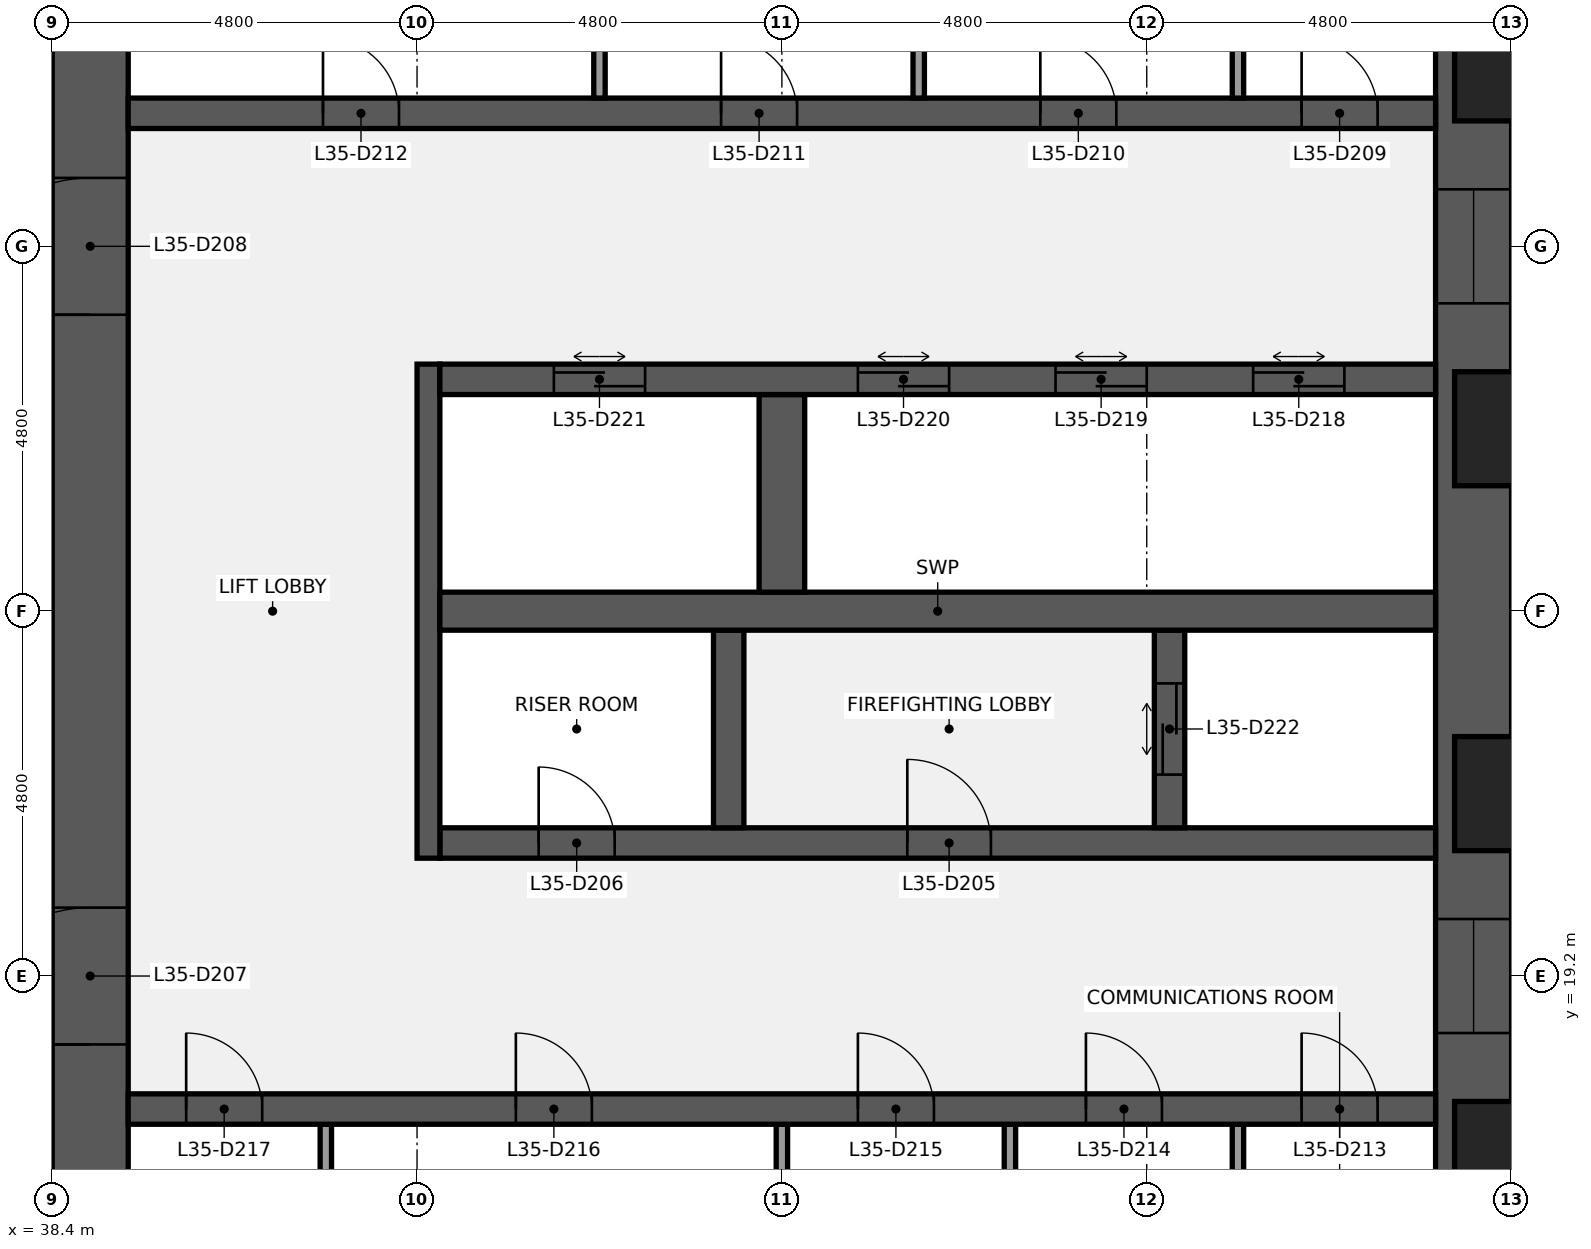
"""IFC4 building model, lengths in metres.
Left out: names, types, materials, properties, quantities, classifications, styles, units other than length and angle.
Written with IfcOpenShell. Run it as: python <this file> out.ifc"""

import sys

from ifc_helpers import new_model, si_unit, direction, frame, frame_2d, origin, place, context, subcontext, project, spatial, rectangle, extrude, element, fill, save


model = new_model("IFC4")
c1 = context("Model", 3, precision=1e-05, world=origin(), true_north=direction((0.0, 1.0)))
c2 = subcontext(c1, "Body", "Model", "MODEL_VIEW")
j1 = project(units=[si_unit("LENGTHUNIT", "METRE"), si_unit("PLANEANGLEUNIT", "RADIAN")], contexts=[c1])
p1 = place(None, origin())
s1 = spatial("IfcSite", under=j1, at=p1, CompositionType="ELEMENT")
p2 = place(p1, origin())
s2 = spatial("IfcBuilding", under=s1, at=p2, CompositionType="ELEMENT")
p3 = place(p2, frame((0.0, 0.0, 160.1)))
s3 = spatial("IfcBuildingStorey", under=s2, at=p3, CompositionType="ELEMENT", Elevation=160.1)
p4 = place(p3, frame((57.1, 38.4, 0.0), z_axis=(0.0, 0.0, 1.0), x_axis=(0.0, -1.0, 0.0)))
e1 = element("IfcWall", 1, at=p4, inside=s3, PredefinedType="SHEAR", context=c2, shape_type="SweptSolid", body=[
    extrude(rectangle(XDim=28.8, YDim=1.0, at=frame_2d((14.4, 0.0))), origin(), (0.0, 0.0, 1.0), 3.84),
])
p5 = place(p4, frame((18.45, 0.0, 0.9)))
e2 = element("IfcOpeningElement", 2, at=p5, cuts=e1, PredefinedType="OPENING", context=c2, shape_type="SweptSolid", body=[
    extrude(rectangle(XDim=1.5, YDim=1.5, at=frame_2d((0.75, 0.75))), frame((0.0, 0.51, 0.0), z_axis=(0.0, -1.0, 0.0), x_axis=(1.0, 0.0, 0.0)), (0.0, 0.0, 1.0), 1.02),
])
p6 = place(p4, frame((8.85, 0.0, 0.9)))
e3 = element("IfcOpeningElement", 3, at=p6, cuts=e1, PredefinedType="OPENING", context=c2, shape_type="SweptSolid", body=[
    extrude(rectangle(XDim=1.5, YDim=1.5, at=frame_2d((0.75, 0.75))), frame((0.0, 0.51, 0.0), z_axis=(0.0, -1.0, 0.0), x_axis=(1.0, 0.0, 0.0)), (0.0, 0.0, 1.0), 1.02),
])
p7 = place(p3, frame((38.9, 9.6, 0.0), z_axis=(0.0, 0.0, 1.0), x_axis=(0.0, 1.0, 0.0)))
e4 = element("IfcWall", 4, at=p7, inside=s3, PredefinedType="SHEAR", context=c2, shape_type="SweptSolid", body=[
    extrude(rectangle(XDim=28.8, YDim=1.0, at=frame_2d((14.4, 0.0))), origin(), (0.0, 0.0, 1.0), 3.84),
])
p8 = place(p7, frame((8.7, 0.0, 0.0)))
e5 = element("IfcOpeningElement", 5, at=p8, cuts=e4, PredefinedType="OPENING", context=c2, shape_type="SweptSolid", body=[
    extrude(rectangle(XDim=1.8, YDim=2.1, at=frame_2d((0.9, 1.05))), frame((0.0, 0.51, 0.0), z_axis=(0.0, -1.0, 0.0), x_axis=(1.0, 0.0, 0.0)), (0.0, 0.0, 1.0), 1.02),
])
p9 = place(p7, frame((18.3, 0.0, 0.0)))
e6 = element("IfcOpeningElement", 6, at=p9, cuts=e4, PredefinedType="OPENING", context=c2, shape_type="SweptSolid", body=[
    extrude(rectangle(XDim=1.8, YDim=2.1, at=frame_2d((0.9, 1.05))), frame((0.0, 0.51, 0.0), z_axis=(0.0, -1.0, 0.0), x_axis=(1.0, 0.0, 0.0)), (0.0, 0.0, 1.0), 1.02),
])
for number, where, z_axis, x_axis in (
    (7, (54.0, 14.65, 0.0), (0.0, 0.0, 1.0), (0.0, 1.0, 0.0)),
    (8, (51.0, 14.65, 0.0), (0.0, 0.0, 1.0), (0.0, 1.0, 0.0)),
    (9, (48.0, 14.65, 0.0), (0.0, 0.0, 1.0), (0.0, 1.0, 0.0)),
    (10, (42.0, 14.65, 0.0), (0.0, 0.0, 1.0), (0.0, 1.0, 0.0)),
):
    element("IfcWall", number, at=place(p3, frame(where, z_axis=z_axis, x_axis=x_axis)), inside=s3, PredefinedType="PARTITIONING", context=c2, shape_type="SweptSolid", body=[
        extrude(rectangle(XDim=2.6, YDim=0.15, at=frame_2d((1.3, 0.0))), origin(), (0.0, 0.0, 1.0), 3.84),
    ])
p10 = place(p3, frame((39.4, 17.45, 0.0), z_axis=(0.0, 0.0, 1.0), x_axis=(1.0, 0.0, 0.0)))
e11 = element("IfcWall", 11, at=p10, inside=s3, PredefinedType="SHEAR", context=c2, shape_type="SweptSolid", body=[
    extrude(rectangle(XDim=17.2, YDim=0.4, at=frame_2d((8.6, 0.0))), origin(), (0.0, 0.0, 1.0), 3.84),
])
p11 = place(p10, frame((15.438, 0.0, 0.0)))
e12 = element("IfcOpeningElement", 12, at=p11, cuts=e11, PredefinedType="OPENING", context=c2, shape_type="SweptSolid", body=[
    extrude(rectangle(XDim=1.0, YDim=2.1, at=frame_2d((0.5, 1.05))), frame((0.0, 0.21, 0.0), z_axis=(0.0, -1.0, 0.0), x_axis=(1.0, 0.0, 0.0)), (0.0, 0.0, 1.0), 0.42),
])
p12 = place(p10, frame((12.6, 0.0, 0.0)))
e13 = element("IfcOpeningElement", 13, at=p12, cuts=e11, PredefinedType="OPENING", context=c2, shape_type="SweptSolid", body=[
    extrude(rectangle(XDim=1.0, YDim=2.1, at=frame_2d((0.5, 1.05))), frame((0.0, 0.21, 0.0), z_axis=(0.0, -1.0, 0.0), x_axis=(1.0, 0.0, 0.0)), (0.0, 0.0, 1.0), 0.42),
])
p13 = place(p10, frame((9.6, 0.0, 0.0)))
e14 = element("IfcOpeningElement", 14, at=p13, cuts=e11, PredefinedType="OPENING", context=c2, shape_type="SweptSolid", body=[
    extrude(rectangle(XDim=1.0, YDim=2.1, at=frame_2d((0.5, 1.05))), frame((0.0, 0.21, 0.0), z_axis=(0.0, -1.0, 0.0), x_axis=(1.0, 0.0, 0.0)), (0.0, 0.0, 1.0), 0.42),
])
p14 = place(p10, frame((5.1, 0.0, 0.0)))
e15 = element("IfcOpeningElement", 15, at=p14, cuts=e11, PredefinedType="OPENING", context=c2, shape_type="SweptSolid", body=[
    extrude(rectangle(XDim=1.0, YDim=2.1, at=frame_2d((0.5, 1.05))), frame((0.0, 0.21, 0.0), z_axis=(0.0, -1.0, 0.0), x_axis=(1.0, 0.0, 0.0)), (0.0, 0.0, 1.0), 0.42),
])
p15 = place(p10, frame((0.762, 0.0, 0.0)))
e16 = element("IfcOpeningElement", 16, at=p15, cuts=e11, PredefinedType="OPENING", context=c2, shape_type="SweptSolid", body=[
    extrude(rectangle(XDim=1.0, YDim=2.1, at=frame_2d((0.5, 1.05))), frame((0.0, 0.21, 0.0), z_axis=(0.0, -1.0, 0.0), x_axis=(1.0, 0.0, 0.0)), (0.0, 0.0, 1.0), 0.42),
])
p16 = place(p3, frame((43.5, 20.95, 0.0), z_axis=(0.0, 0.0, 1.0), x_axis=(1.0, 0.0, 0.0)))
e17 = element("IfcWall", 17, at=p16, inside=s3, PredefinedType="SHEAR", context=c2, shape_type="SweptSolid", body=[
    extrude(rectangle(XDim=13.1, YDim=0.4, at=frame_2d((6.55, 0.0))), origin(), (0.0, 0.0, 1.0), 3.84),
])
p17 = place(p16, frame((6.15, 0.0, 0.0)))
e18 = element("IfcOpeningElement", 18, at=p17, cuts=e17, PredefinedType="OPENING", context=c2, shape_type="SweptSolid", body=[
    extrude(rectangle(XDim=1.1, YDim=2.1, at=frame_2d((0.55, 1.05))), frame((0.0, 0.21, 0.0), z_axis=(0.0, -1.0, 0.0), x_axis=(1.0, 0.0, 0.0)), (0.0, 0.0, 1.0), 0.42),
])
p18 = place(p16, frame((1.3, 0.0, 0.0)))
e19 = element("IfcOpeningElement", 19, at=p18, cuts=e17, PredefinedType="OPENING", context=c2, shape_type="SweptSolid", body=[
    extrude(rectangle(XDim=1.0, YDim=2.1, at=frame_2d((0.5, 1.05))), frame((0.0, 0.21, 0.0), z_axis=(0.0, -1.0, 0.0), x_axis=(1.0, 0.0, 0.0)), (0.0, 0.0, 1.0), 0.42),
])
p19 = place(p3, frame((43.35, 20.75, 0.0), z_axis=(0.0, 0.0, 1.0), x_axis=(0.0, 1.0, 0.0)))
e20 = element("IfcWall", 20, at=p19, inside=s3, PredefinedType="SHEAR", context=c2, shape_type="SweptSolid", body=[
    extrude(rectangle(XDim=6.5, YDim=0.3, at=frame_2d((3.25, 0.0))), origin(), (0.0, 0.0, 1.0), 3.84),
])
p20 = place(p3, frame((53.1, 21.15, 0.0), z_axis=(0.0, 0.0, 1.0), x_axis=(0.0, 1.0, 0.0)))
e21 = element("IfcWall", 21, at=p20, inside=s3, PredefinedType="SHEAR", context=c2, shape_type="SweptSolid", body=[
    extrude(rectangle(XDim=2.6, YDim=0.4, at=frame_2d((1.3, 0.0))), origin(), (0.0, 0.0, 1.0), 3.84),
])
p21 = place(p20, frame((0.7, 0.0, 0.0)))
e22 = element("IfcOpeningElement", 22, at=p21, cuts=e21, PredefinedType="OPENING", context=c2, shape_type="SweptSolid", body=[
    extrude(rectangle(XDim=1.2, YDim=2.1, at=frame_2d((0.6, 1.05))), frame((0.0, 0.21, 0.0), z_axis=(0.0, -1.0, 0.0), x_axis=(1.0, 0.0, 0.0)), (0.0, 0.0, 1.0), 0.42),
])
p22 = place(p3, frame((47.3, 21.15, 0.0), z_axis=(0.0, 0.0, 1.0), x_axis=(0.0, 1.0, 0.0)))
e23 = element("IfcWall", 23, at=p22, inside=s3, PredefinedType="SHEAR", context=c2, shape_type="SweptSolid", body=[
    extrude(rectangle(XDim=2.6, YDim=0.4, at=frame_2d((1.3, 0.0))), origin(), (0.0, 0.0, 1.0), 3.84),
])
p23 = place(p3, frame((43.5, 24.0, 0.0), z_axis=(0.0, 0.0, 1.0), x_axis=(1.0, 0.0, 0.0)))
e24 = element("IfcWall", 24, at=p23, inside=s3, PredefinedType="SHEAR", context=c2, shape_type="SweptSolid", body=[
    extrude(rectangle(XDim=13.1, YDim=0.5, at=frame_2d((6.55, 0.0))), origin(), (0.0, 0.0, 1.0), 3.84),
])
p24 = place(p3, frame((48.0, 24.25, 0.0), z_axis=(0.0, 0.0, 1.0), x_axis=(0.0, 1.0, 0.0)))
e25 = element("IfcWall", 25, at=p24, inside=s3, PredefinedType="SHEAR", context=c2, shape_type="SweptSolid", body=[
    extrude(rectangle(XDim=2.6, YDim=0.6, at=frame_2d((1.3, 0.0))), origin(), (0.0, 0.0, 1.0), 3.84),
])
p25 = place(p3, frame((43.5, 27.05, 0.0), z_axis=(0.0, 0.0, 1.0), x_axis=(1.0, 0.0, 0.0)))
e26 = element("IfcWall", 26, at=p25, inside=s3, PredefinedType="SHEAR", context=c2, shape_type="SweptSolid", body=[
    extrude(rectangle(XDim=13.1, YDim=0.4, at=frame_2d((6.55, 0.0))), origin(), (0.0, 0.0, 1.0), 3.84),
])
p26 = place(p25, frame((10.7, 0.0, 0.0)))
e27 = element("IfcOpeningElement", 27, at=p26, cuts=e26, PredefinedType="OPENING", context=c2, shape_type="SweptSolid", body=[
    extrude(rectangle(XDim=1.2, YDim=2.1, at=frame_2d((0.6, 1.05))), frame((0.0, 0.21, 0.0), z_axis=(0.0, -1.0, 0.0), x_axis=(1.0, 0.0, 0.0)), (0.0, 0.0, 1.0), 0.42),
])
p27 = place(p25, frame((8.1, 0.0, 0.0)))
e28 = element("IfcOpeningElement", 28, at=p27, cuts=e26, PredefinedType="OPENING", context=c2, shape_type="SweptSolid", body=[
    extrude(rectangle(XDim=1.2, YDim=2.1, at=frame_2d((0.6, 1.05))), frame((0.0, 0.21, 0.0), z_axis=(0.0, -1.0, 0.0), x_axis=(1.0, 0.0, 0.0)), (0.0, 0.0, 1.0), 0.42),
])
p28 = place(p25, frame((5.5, 0.0, 0.0)))
e29 = element("IfcOpeningElement", 29, at=p28, cuts=e26, PredefinedType="OPENING", context=c2, shape_type="SweptSolid", body=[
    extrude(rectangle(XDim=1.2, YDim=2.1, at=frame_2d((0.6, 1.05))), frame((0.0, 0.21, 0.0), z_axis=(0.0, -1.0, 0.0), x_axis=(1.0, 0.0, 0.0)), (0.0, 0.0, 1.0), 0.42),
])
p29 = place(p25, frame((1.5, 0.0, 0.0)))
e30 = element("IfcOpeningElement", 30, at=p29, cuts=e26, PredefinedType="OPENING", context=c2, shape_type="SweptSolid", body=[
    extrude(rectangle(XDim=1.2, YDim=2.1, at=frame_2d((0.6, 1.05))), frame((0.0, 0.21, 0.0), z_axis=(0.0, -1.0, 0.0), x_axis=(1.0, 0.0, 0.0)), (0.0, 0.0, 1.0), 0.42),
])
p30 = place(p3, frame((39.4, 30.55, 0.0), z_axis=(0.0, 0.0, 1.0), x_axis=(1.0, 0.0, 0.0)))
e31 = element("IfcWall", 31, at=p30, inside=s3, PredefinedType="SHEAR", context=c2, shape_type="SweptSolid", body=[
    extrude(rectangle(XDim=17.2, YDim=0.4, at=frame_2d((8.6, 0.0))), origin(), (0.0, 0.0, 1.0), 3.84),
])
p31 = place(p30, frame((15.438, 0.0, 0.0)))
e32 = element("IfcOpeningElement", 32, at=p31, cuts=e31, PredefinedType="OPENING", context=c2, shape_type="SweptSolid", body=[
    extrude(rectangle(XDim=1.0, YDim=2.1, at=frame_2d((0.5, 1.05))), frame((0.0, 0.21, 0.0), z_axis=(0.0, -1.0, 0.0), x_axis=(1.0, 0.0, 0.0)), (0.0, 0.0, 1.0), 0.42),
])
p32 = place(p30, frame((12.0, 0.0, 0.0)))
e33 = element("IfcOpeningElement", 33, at=p32, cuts=e31, PredefinedType="OPENING", context=c2, shape_type="SweptSolid", body=[
    extrude(rectangle(XDim=1.0, YDim=2.1, at=frame_2d((0.5, 1.05))), frame((0.0, 0.21, 0.0), z_axis=(0.0, -1.0, 0.0), x_axis=(1.0, 0.0, 0.0)), (0.0, 0.0, 1.0), 0.42),
])
p33 = place(p30, frame((7.8, 0.0, 0.0)))
e34 = element("IfcOpeningElement", 34, at=p33, cuts=e31, PredefinedType="OPENING", context=c2, shape_type="SweptSolid", body=[
    extrude(rectangle(XDim=1.0, YDim=2.1, at=frame_2d((0.5, 1.05))), frame((0.0, 0.21, 0.0), z_axis=(0.0, -1.0, 0.0), x_axis=(1.0, 0.0, 0.0)), (0.0, 0.0, 1.0), 0.42),
])
p34 = place(p30, frame((2.562, 0.0, 0.0)))
e35 = element("IfcOpeningElement", 35, at=p34, cuts=e31, PredefinedType="OPENING", context=c2, shape_type="SweptSolid", body=[
    extrude(rectangle(XDim=1.0, YDim=2.1, at=frame_2d((0.5, 1.05))), frame((0.0, 0.21, 0.0), z_axis=(0.0, -1.0, 0.0), x_axis=(1.0, 0.0, 0.0)), (0.0, 0.0, 1.0), 0.42),
])
for number, where, z_axis, x_axis in (
    (36, (54.0, 30.75, 0.0), (0.0, 0.0, 1.0), (0.0, 1.0, 0.0)),
    (37, (49.8, 30.75, 0.0), (0.0, 0.0, 1.0), (0.0, 1.0, 0.0)),
    (38, (45.6, 30.75, 0.0), (0.0, 0.0, 1.0), (0.0, 1.0, 0.0)),
):
    element("IfcWall", number, at=place(p3, frame(where, z_axis=z_axis, x_axis=x_axis)), inside=s3, PredefinedType="PARTITIONING", context=c2, shape_type="SweptSolid", body=[
        extrude(rectangle(XDim=2.6, YDim=0.15, at=frame_2d((1.3, 0.0))), origin(), (0.0, 0.0, 1.0), 3.84),
    ])
p35 = place(p17, origin())
e39 = element("IfcDoor", 39, at=p35, inside=s3, OperationType="SINGLE_SWING_LEFT", PredefinedType="DOOR", context=c2, shape_type="SweptSolid", body=[
    extrude(rectangle(XDim=1.1, YDim=2.1, at=frame_2d((0.55, 1.05))), frame((0.0, 0.025, 0.0), z_axis=(0.0, -1.0, 0.0), x_axis=(1.0, 0.0, 0.0)), (0.0, 0.0, 1.0), 0.05),
])
fill(e18, e39)
p36 = place(p18, origin())
e40 = element("IfcDoor", 40, at=p36, inside=s3, OperationType="SINGLE_SWING_LEFT", PredefinedType="DOOR", context=c2, shape_type="SweptSolid", body=[
    extrude(rectangle(XDim=1.0, YDim=2.1, at=frame_2d((0.5, 1.05))), frame((0.0, 0.025, 0.0), z_axis=(0.0, -1.0, 0.0), x_axis=(1.0, 0.0, 0.0)), (0.0, 0.0, 1.0), 0.05),
])
fill(e19, e40)
p37 = place(p8, origin())
e41 = element("IfcDoor", 41, at=p37, inside=s3, OperationType="DOUBLE_DOOR_SINGLE_SWING", PredefinedType="DOOR", context=c2, shape_type="SweptSolid", body=[
    extrude(rectangle(XDim=1.8, YDim=2.1, at=frame_2d((0.9, 1.05))), frame((0.0, 0.025, 0.0), z_axis=(0.0, -1.0, 0.0), x_axis=(1.0, 0.0, 0.0)), (0.0, 0.0, 1.0), 0.05),
])
fill(e5, e41)
p38 = place(p9, origin())
e42 = element("IfcDoor", 42, at=p38, inside=s3, OperationType="DOUBLE_DOOR_SINGLE_SWING", PredefinedType="DOOR", context=c2, shape_type="SweptSolid", body=[
    extrude(rectangle(XDim=1.8, YDim=2.1, at=frame_2d((0.9, 1.05))), frame((0.0, 0.025, 0.0), z_axis=(0.0, -1.0, 0.0), x_axis=(1.0, 0.0, 0.0)), (0.0, 0.0, 1.0), 0.05),
])
fill(e6, e42)
p39 = place(p31, origin())
e43 = element("IfcDoor", 43, at=p39, inside=s3, OperationType="SINGLE_SWING_LEFT", PredefinedType="DOOR", context=c2, shape_type="SweptSolid", body=[
    extrude(rectangle(XDim=1.0, YDim=2.1, at=frame_2d((0.5, 1.05))), frame((0.0, 0.025, 0.0), z_axis=(0.0, -1.0, 0.0), x_axis=(1.0, 0.0, 0.0)), (0.0, 0.0, 1.0), 0.05),
])
fill(e32, e43)
p40 = place(p32, origin())
e44 = element("IfcDoor", 44, at=p40, inside=s3, OperationType="SINGLE_SWING_LEFT", PredefinedType="DOOR", context=c2, shape_type="SweptSolid", body=[
    extrude(rectangle(XDim=1.0, YDim=2.1, at=frame_2d((0.5, 1.05))), frame((0.0, 0.025, 0.0), z_axis=(0.0, -1.0, 0.0), x_axis=(1.0, 0.0, 0.0)), (0.0, 0.0, 1.0), 0.05),
])
fill(e33, e44)
p41 = place(p33, origin())
e45 = element("IfcDoor", 45, at=p41, inside=s3, OperationType="SINGLE_SWING_LEFT", PredefinedType="DOOR", context=c2, shape_type="SweptSolid", body=[
    extrude(rectangle(XDim=1.0, YDim=2.1, at=frame_2d((0.5, 1.05))), frame((0.0, 0.025, 0.0), z_axis=(0.0, -1.0, 0.0), x_axis=(1.0, 0.0, 0.0)), (0.0, 0.0, 1.0), 0.05),
])
fill(e34, e45)
p42 = place(p34, origin())
e46 = element("IfcDoor", 46, at=p42, inside=s3, OperationType="SINGLE_SWING_LEFT", PredefinedType="DOOR", context=c2, shape_type="SweptSolid", body=[
    extrude(rectangle(XDim=1.0, YDim=2.1, at=frame_2d((0.5, 1.05))), frame((0.0, 0.025, 0.0), z_axis=(0.0, -1.0, 0.0), x_axis=(1.0, 0.0, 0.0)), (0.0, 0.0, 1.0), 0.05),
])
fill(e35, e46)
p43 = place(p11, origin())
e47 = element("IfcDoor", 47, at=p43, inside=s3, OperationType="SINGLE_SWING_LEFT", PredefinedType="DOOR", context=c2, shape_type="SweptSolid", body=[
    extrude(rectangle(XDim=1.0, YDim=2.1, at=frame_2d((0.5, 1.05))), frame((0.0, 0.025, 0.0), z_axis=(0.0, -1.0, 0.0), x_axis=(1.0, 0.0, 0.0)), (0.0, 0.0, 1.0), 0.05),
])
fill(e12, e47)
p44 = place(p12, origin())
e48 = element("IfcDoor", 48, at=p44, inside=s3, OperationType="SINGLE_SWING_LEFT", PredefinedType="DOOR", context=c2, shape_type="SweptSolid", body=[
    extrude(rectangle(XDim=1.0, YDim=2.1, at=frame_2d((0.5, 1.05))), frame((0.0, 0.025, 0.0), z_axis=(0.0, -1.0, 0.0), x_axis=(1.0, 0.0, 0.0)), (0.0, 0.0, 1.0), 0.05),
])
fill(e13, e48)
p45 = place(p13, origin())
e49 = element("IfcDoor", 49, at=p45, inside=s3, OperationType="SINGLE_SWING_LEFT", PredefinedType="DOOR", context=c2, shape_type="SweptSolid", body=[
    extrude(rectangle(XDim=1.0, YDim=2.1, at=frame_2d((0.5, 1.05))), frame((0.0, 0.025, 0.0), z_axis=(0.0, -1.0, 0.0), x_axis=(1.0, 0.0, 0.0)), (0.0, 0.0, 1.0), 0.05),
])
fill(e14, e49)
p46 = place(p14, origin())
e50 = element("IfcDoor", 50, at=p46, inside=s3, OperationType="SINGLE_SWING_LEFT", PredefinedType="DOOR", context=c2, shape_type="SweptSolid", body=[
    extrude(rectangle(XDim=1.0, YDim=2.1, at=frame_2d((0.5, 1.05))), frame((0.0, 0.025, 0.0), z_axis=(0.0, -1.0, 0.0), x_axis=(1.0, 0.0, 0.0)), (0.0, 0.0, 1.0), 0.05),
])
fill(e15, e50)
p47 = place(p15, origin())
e51 = element("IfcDoor", 51, at=p47, inside=s3, OperationType="SINGLE_SWING_LEFT", PredefinedType="DOOR", context=c2, shape_type="SweptSolid", body=[
    extrude(rectangle(XDim=1.0, YDim=2.1, at=frame_2d((0.5, 1.05))), frame((0.0, 0.025, 0.0), z_axis=(0.0, -1.0, 0.0), x_axis=(1.0, 0.0, 0.0)), (0.0, 0.0, 1.0), 0.05),
])
fill(e16, e51)
p48 = place(p26, origin())
e52 = element("IfcDoor", 52, at=p48, inside=s3, OperationType="DOUBLE_DOOR_SLIDING", PredefinedType="DOOR", context=c2, shape_type="SweptSolid", body=[
    extrude(rectangle(XDim=1.2, YDim=2.1, at=frame_2d((0.6, 1.05))), frame((0.0, 0.025, 0.0), z_axis=(0.0, -1.0, 0.0), x_axis=(1.0, 0.0, 0.0)), (0.0, 0.0, 1.0), 0.05),
])
fill(e27, e52)
p49 = place(p27, origin())
e53 = element("IfcDoor", 53, at=p49, inside=s3, OperationType="DOUBLE_DOOR_SLIDING", PredefinedType="DOOR", context=c2, shape_type="SweptSolid", body=[
    extrude(rectangle(XDim=1.2, YDim=2.1, at=frame_2d((0.6, 1.05))), frame((0.0, 0.025, 0.0), z_axis=(0.0, -1.0, 0.0), x_axis=(1.0, 0.0, 0.0)), (0.0, 0.0, 1.0), 0.05),
])
fill(e28, e53)
p50 = place(p28, origin())
e54 = element("IfcDoor", 54, at=p50, inside=s3, OperationType="DOUBLE_DOOR_SLIDING", PredefinedType="DOOR", context=c2, shape_type="SweptSolid", body=[
    extrude(rectangle(XDim=1.2, YDim=2.1, at=frame_2d((0.6, 1.05))), frame((0.0, 0.025, 0.0), z_axis=(0.0, -1.0, 0.0), x_axis=(1.0, 0.0, 0.0)), (0.0, 0.0, 1.0), 0.05),
])
fill(e29, e54)
p51 = place(p29, origin())
e55 = element("IfcDoor", 55, at=p51, inside=s3, OperationType="DOUBLE_DOOR_SLIDING", PredefinedType="DOOR", context=c2, shape_type="SweptSolid", body=[
    extrude(rectangle(XDim=1.2, YDim=2.1, at=frame_2d((0.6, 1.05))), frame((0.0, 0.025, 0.0), z_axis=(0.0, -1.0, 0.0), x_axis=(1.0, 0.0, 0.0)), (0.0, 0.0, 1.0), 0.05),
])
fill(e30, e55)
p52 = place(p21, origin())
e56 = element("IfcDoor", 56, at=p52, inside=s3, OperationType="DOUBLE_DOOR_SLIDING", PredefinedType="DOOR", context=c2, shape_type="SweptSolid", body=[
    extrude(rectangle(XDim=1.2, YDim=2.1, at=frame_2d((0.6, 1.05))), frame((0.0, 0.025, 0.0), z_axis=(0.0, -1.0, 0.0), x_axis=(1.0, 0.0, 0.0)), (0.0, 0.0, 1.0), 0.05),
])
fill(e22, e56)
p53 = place(p5, origin())
e57 = element("IfcWindow", 57, at=p53, inside=s3, PartitioningType="SINGLE_PANEL", PredefinedType="WINDOW", context=c2, shape_type="SweptSolid", body=[
    extrude(rectangle(XDim=1.5, YDim=1.5, at=frame_2d((0.75, 0.75))), frame((0.0, 0.03, 0.0), z_axis=(0.0, -1.0, 0.0), x_axis=(1.0, 0.0, 0.0)), (0.0, 0.0, 1.0), 0.06),
])
fill(e2, e57)
p54 = place(p6, origin())
e58 = element("IfcWindow", 58, at=p54, inside=s3, PartitioningType="SINGLE_PANEL", PredefinedType="WINDOW", context=c2, shape_type="SweptSolid", body=[
    extrude(rectangle(XDim=1.5, YDim=1.5, at=frame_2d((0.75, 0.75))), frame((0.0, 0.03, 0.0), z_axis=(0.0, -1.0, 0.0), x_axis=(1.0, 0.0, 0.0)), (0.0, 0.0, 1.0), 0.06),
])
fill(e3, e58)
save(model, sys.argv[1])
